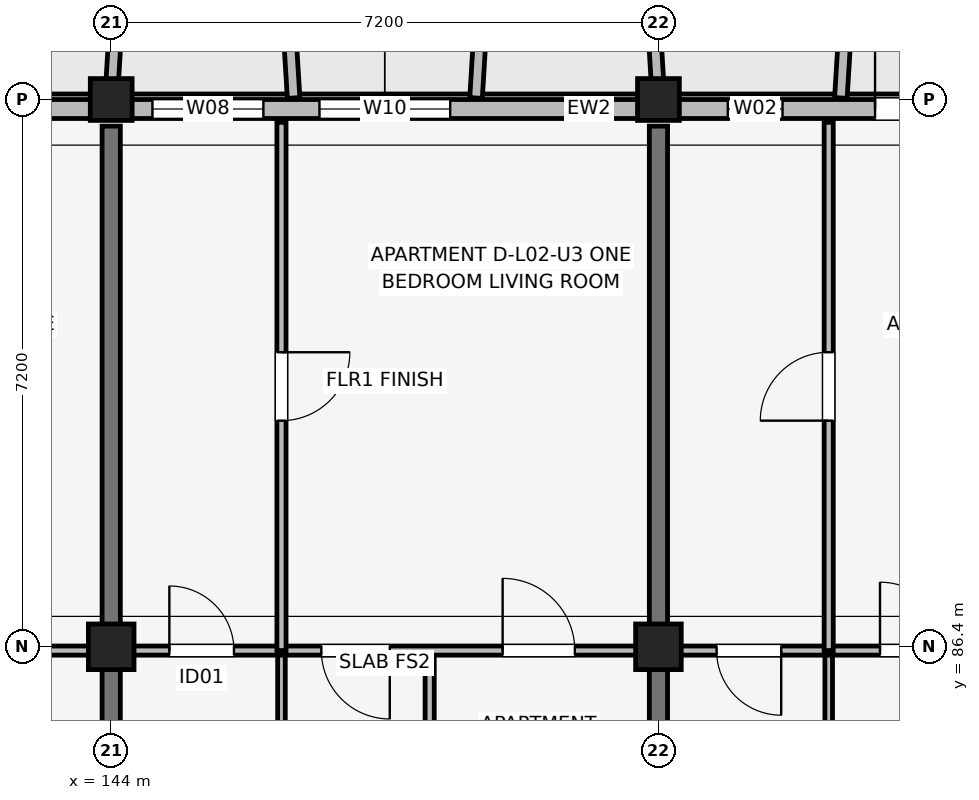
"""IFC4 building model, lengths in metres.
Left out: names, types, materials, properties, quantities, classifications, styles, units other than length and angle.
Written with IfcOpenShell. Run it as: python <this file> out.ifc"""

import sys

from ifc_helpers import new_model, si_unit, direction, frame, frame_2d, origin, origin_2d, place, context, subcontext, project, spatial, rectangle, extrude, element, fill, save


model = new_model("IFC4")
c1 = context("Model", 3, precision=1e-05, world=origin(), true_north=direction((0.0, 1.0)))
c2 = subcontext(c1, "Body", "Model", "MODEL_VIEW")
j1 = project(units=[si_unit("LENGTHUNIT", "METRE"), si_unit("PLANEANGLEUNIT", "RADIAN")], contexts=[c1])
p1 = place(None, origin())
s1 = spatial("IfcSite", under=j1, at=p1, CompositionType="ELEMENT")
p2 = place(p1, origin())
s2 = spatial("IfcBuilding", under=s1, at=p2, CompositionType="ELEMENT")
p3 = place(p2, frame((0.0, 0.0, 8.7)))
s3 = spatial("IfcBuildingStorey", under=s2, at=p3, CompositionType="ELEMENT", Elevation=8.7)
p4 = place(p3, frame((144.0, 86.4, 0.0), z_axis=(0.0, 0.0, 1.0), x_axis=(1.0, 0.0, 0.0)))
e1 = element("IfcColumn", 1, at=p4, inside=s3, PredefinedType="COLUMN", context=c2, shape_type="SweptSolid", body=[
    extrude(rectangle(XDim=0.6, YDim=0.6, at=origin_2d()), origin(), (0.0, 0.0, 1.0), 3.15),
])
p5 = place(p3, frame((144.0, 93.6, 0.0), z_axis=(0.0, 0.0, 1.0), x_axis=(1.0, 0.0, 0.0)))
e2 = element("IfcColumn", 2, at=p5, inside=s3, PredefinedType="COLUMN", context=c2, shape_type="SweptSolid", body=[
    extrude(rectangle(XDim=0.55, YDim=0.55, at=origin_2d()), origin(), (0.0, 0.0, 1.0), 3.15),
])
p6 = place(p3, frame((151.2, 86.4, 0.0), z_axis=(0.0, 0.0, 1.0), x_axis=(1.0, 0.0, 0.0)))
e3 = element("IfcColumn", 3, at=p6, inside=s3, PredefinedType="COLUMN", context=c2, shape_type="SweptSolid", body=[
    extrude(rectangle(XDim=0.6, YDim=0.6, at=origin_2d()), origin(), (0.0, 0.0, 1.0), 3.15),
])
p7 = place(p3, frame((151.2, 93.6, 0.0), z_axis=(0.0, 0.0, 1.0), x_axis=(1.0, 0.0, 0.0)))
e4 = element("IfcColumn", 4, at=p7, inside=s3, PredefinedType="COLUMN", context=c2, shape_type="SweptSolid", body=[
    extrude(rectangle(XDim=0.55, YDim=0.55, at=origin_2d()), origin(), (0.0, 0.0, 1.0), 3.15),
])
for number, where, z_axis, x_axis in (
    (5, (144.0, 83.85, 0.0), (0.0, 0.0, 1.0), (0.0, 1.0, 0.0)),
    (6, (151.2, 83.85, 0.0), (0.0, 0.0, 1.0), (0.0, 1.0, 0.0)),
):
    element("IfcWall", number, at=place(p3, frame(where, z_axis=z_axis, x_axis=x_axis)), inside=s3, PredefinedType="SHEAR", context=c2, shape_type="SweptSolid", body=[
        extrude(rectangle(XDim=9.4, YDim=0.24, at=frame_2d((4.7, 0.0))), origin(), (0.0, 0.0, 1.0), 3.15),
    ])
p8 = place(p3, frame((162.8, 93.475, 0.0), z_axis=(0.0, 0.0, 1.0), x_axis=(-1.0, 0.0, 0.0)))
e7 = element("IfcWall", 7, at=p8, inside=s3, PredefinedType="SOLIDWALL", context=c2, shape_type="SweptSolid", body=[
    extrude(rectangle(XDim=30.4, YDim=0.25, at=frame_2d((15.2, 0.0))), origin(), (0.0, 0.0, 1.0), 2.43),
])
p9 = place(p8, frame((23.225, 0.0, 0.0), z_axis=(0.0, 0.0, 1.0), x_axis=(-1.0, 0.0, 0.0)))
e8 = element("IfcOpeningElement", 8, at=p9, cuts=e7, PredefinedType="OPENING", context=c2, shape_type="SweptSolid", body=[
    extrude(rectangle(XDim=1.65, YDim=2.15, at=frame_2d((0.825, 1.075))), frame((0.0, 0.135, 0.0), z_axis=(0.0, -1.0, 0.0), x_axis=(1.0, 0.0, 0.0)), (0.0, 0.0, 1.0), 0.27),
])
p10 = place(p8, frame((8.75, 0.0, 0.0), z_axis=(0.0, 0.0, 1.0), x_axis=(-1.0, 0.0, 0.0)))
e9 = element("IfcOpeningElement", 9, at=p10, cuts=e7, PredefinedType="OPENING", context=c2, shape_type="SweptSolid", body=[
    extrude(rectangle(XDim=1.5, YDim=2.15, at=frame_2d((0.75, 1.075))), frame((0.0, 0.135, 0.0), z_axis=(0.0, -1.0, 0.0), x_axis=(1.0, 0.0, 0.0)), (0.0, 0.0, 1.0), 0.27),
])
p11 = place(p8, frame((26.438, 0.0, 0.75)))
e10 = element("IfcOpeningElement", 10, at=p11, cuts=e7, PredefinedType="OPENING", context=c2, shape_type="SweptSolid", body=[
    extrude(rectangle(XDim=1.22, YDim=1.5, at=frame_2d((0.61, 0.75))), frame((0.0, 0.135, 0.0), z_axis=(0.0, -1.0, 0.0), x_axis=(1.0, 0.0, 0.0)), (0.0, 0.0, 1.0), 0.27),
])
p12 = place(p8, frame((24.183, 0.0, 0.75)))
e11 = element("IfcOpeningElement", 11, at=p12, cuts=e7, PredefinedType="OPENING", context=c2, shape_type="SweptSolid", body=[
    extrude(rectangle(XDim=1.34, YDim=1.55, at=frame_2d((0.67, 0.775))), frame((0.0, 0.135, 0.0), z_axis=(0.0, -1.0, 0.0), x_axis=(1.0, 0.0, 0.0)), (0.0, 0.0, 1.0), 0.27),
])
p13 = place(p8, frame((16.798, 0.0, 0.75)))
e12 = element("IfcOpeningElement", 12, at=p13, cuts=e7, PredefinedType="OPENING", context=c2, shape_type="SweptSolid", body=[
    extrude(rectangle(XDim=1.46, YDim=1.55, at=frame_2d((0.73, 0.775))), frame((0.0, 0.135, 0.0), z_axis=(0.0, -1.0, 0.0), x_axis=(1.0, 0.0, 0.0)), (0.0, 0.0, 1.0), 0.27),
])
p14 = place(p8, frame((14.34, 0.0, 0.7)))
e13 = element("IfcOpeningElement", 13, at=p14, cuts=e7, PredefinedType="OPENING", context=c2, shape_type="SweptSolid", body=[
    extrude(rectangle(XDim=1.72, YDim=1.6, at=frame_2d((0.86, 0.8))), frame((0.0, 0.135, 0.0), z_axis=(0.0, -1.0, 0.0), x_axis=(1.0, 0.0, 0.0)), (0.0, 0.0, 1.0), 0.27),
])
p15 = place(p8, frame((9.968, 0.0, 0.75)))
e14 = element("IfcOpeningElement", 14, at=p15, cuts=e7, PredefinedType="OPENING", context=c2, shape_type="SweptSolid", body=[
    extrude(rectangle(XDim=0.72, YDim=1.35, at=frame_2d((0.36, 0.675))), frame((0.0, 0.135, 0.0), z_axis=(0.0, -1.0, 0.0), x_axis=(1.0, 0.0, 0.0)), (0.0, 0.0, 1.0), 0.27),
])
p16 = place(p8, frame((2.183, 0.0, 0.7)))
e15 = element("IfcOpeningElement", 15, at=p16, cuts=e7, PredefinedType="OPENING", context=c2, shape_type="SweptSolid", body=[
    extrude(rectangle(XDim=1.72, YDim=1.6, at=frame_2d((0.86, 0.8))), frame((0.0, 0.135, 0.0), z_axis=(0.0, -1.0, 0.0), x_axis=(1.0, 0.0, 0.0)), (0.0, 0.0, 1.0), 0.27),
])
p17 = place(p3, frame((144.0, 93.62, 0.0), z_axis=(0.0, 0.0, 1.0), x_axis=(0.061170732449, 0.998127317276, 0.0)))
e16 = element("IfcWall", 16, at=p17, inside=s3, PredefinedType="ELEMENTEDWALL", context=c2, shape_type="SweptSolid", body=[
    extrude(rectangle(XDim=1.964, YDim=0.165, at=frame_2d((0.982, 0.0))), origin(), (0.0, 0.0, 1.0), 2.95),
])
for number, where, z_axis, x_axis in (
    (17, (146.4, 93.62, 0.0), (0.0, 0.0, 1.0), (-0.061, 0.998, 0.0)),
    (18, (148.8, 93.62, 0.0), (0.0, 0.0, 1.0), (0.061, 0.998, 0.0)),
):
    element("IfcWall", number, at=place(p3, frame(where, z_axis=z_axis, x_axis=x_axis)), inside=s3, PredefinedType="ELEMENTEDWALL", context=c2, shape_type="SweptSolid", body=[
        extrude(rectangle(XDim=1.964, YDim=0.165, at=frame_2d((0.982, 0.0))), origin(), (0.0, 0.0, 1.0), 2.53),
    ])
p18 = place(p3, frame((151.2, 93.62, 0.0), z_axis=(0.0, 0.0, 1.0), x_axis=(-0.061046865508, 0.998134900808, 0.0)))
e19 = element("IfcWall", 19, at=p18, inside=s3, PredefinedType="ELEMENTEDWALL", context=c2, shape_type="SweptSolid", body=[
    extrude(rectangle(XDim=1.964, YDim=0.165, at=frame_2d((0.982, 0.0))), origin(), (0.0, 0.0, 1.0), 2.95),
])
p19 = place(p3, frame((153.6, 93.62, 0.0), z_axis=(0.0, 0.0, 1.0), x_axis=(0.061046865508, 0.998134900808, 0.0)))
e20 = element("IfcWall", 20, at=p19, inside=s3, PredefinedType="ELEMENTEDWALL", context=c2, shape_type="SweptSolid", body=[
    extrude(rectangle(XDim=1.964, YDim=0.165, at=frame_2d((0.982, 0.0))), origin(), (0.0, 0.0, 1.0), 2.55),
])
p20 = place(p3, frame((136.94, 86.35, 0.0), z_axis=(0.0, 0.0, 1.0), x_axis=(1.0, 0.0, 0.0)))
e21 = element("IfcWall", 21, at=p20, inside=s3, PredefinedType="PARTITIONING", context=c2, shape_type="SweptSolid", body=[
    extrude(rectangle(XDim=6.92, YDim=0.12, at=frame_2d((3.46, 0.0))), origin(), (0.0, 0.0, 1.0), 2.375),
])
p21 = place(p20, frame((1.35, 0.0, 0.0), z_axis=(0.0, 0.0, 1.0), x_axis=(-1.0, 0.0, 0.0)))
e22 = element("IfcOpeningElement", 22, at=p21, cuts=e21, PredefinedType="OPENING", context=c2, shape_type="SweptSolid", body=[
    extrude(rectangle(XDim=0.85, YDim=2.08, at=frame_2d((0.425, 1.04))), frame((0.0, 0.07, 0.0), z_axis=(0.0, -1.0, 0.0), x_axis=(1.0, 0.0, 0.0)), (0.0, 0.0, 1.0), 0.14),
])
p22 = place(p20, frame((2.525, 0.0, 0.0)))
e23 = element("IfcOpeningElement", 23, at=p22, cuts=e21, PredefinedType="OPENING", context=c2, shape_type="SweptSolid", body=[
    extrude(rectangle(XDim=0.9, YDim=2.08, at=frame_2d((0.45, 1.04))), frame((0.0, 0.07, 0.0), z_axis=(0.0, -1.0, 0.0), x_axis=(1.0, 0.0, 0.0)), (0.0, 0.0, 1.0), 0.14),
])
p23 = place(p20, frame((5.985, 0.0, 0.0), z_axis=(0.0, 0.0, 1.0), x_axis=(-1.0, 0.0, 0.0)))
e24 = element("IfcOpeningElement", 24, at=p23, cuts=e21, PredefinedType="OPENING", context=c2, shape_type="SweptSolid", body=[
    extrude(rectangle(XDim=0.95, YDim=2.08, at=frame_2d((0.475, 1.04))), frame((0.0, 0.07, 0.0), z_axis=(0.0, -1.0, 0.0), x_axis=(1.0, 0.0, 0.0)), (0.0, 0.0, 1.0), 0.14),
])
p24 = place(p3, frame((146.24, 83.7, 0.0), z_axis=(0.0, 0.0, 1.0), x_axis=(0.0, 1.0, 0.0)))
e25 = element("IfcWall", 25, at=p24, inside=s3, PredefinedType="PARTITIONING", context=c2, shape_type="SweptSolid", body=[
    extrude(rectangle(XDim=2.65, YDim=0.1, at=frame_2d((1.325, 0.0))), origin(), (0.0, 0.0, 1.0), 2.375),
])
p25 = place(p3, frame((148.19, 83.7, 0.0), z_axis=(0.0, 0.0, 1.0), x_axis=(0.0, 1.0, 0.0)))
e26 = element("IfcWall", 26, at=p25, inside=s3, PredefinedType="PARTITIONING", context=c2, shape_type="SweptSolid", body=[
    extrude(rectangle(XDim=2.65, YDim=0.12, at=frame_2d((1.325, 0.0))), origin(), (0.0, 0.0, 1.0), 2.375),
])
p26 = place(p3, frame((144.14, 86.35, 0.0), z_axis=(0.0, 0.0, 1.0), x_axis=(1.0, 0.0, 0.0)))
e27 = element("IfcWall", 27, at=p26, inside=s3, PredefinedType="PARTITIONING", context=c2, shape_type="SweptSolid", body=[
    extrude(rectangle(XDim=6.92, YDim=0.12, at=frame_2d((3.46, 0.0))), origin(), (0.0, 0.0, 1.0), 2.375),
])
p27 = place(p26, frame((0.625, 0.0, 0.0)))
e28 = element("IfcOpeningElement", 28, at=p27, cuts=e27, PredefinedType="OPENING", context=c2, shape_type="SweptSolid", body=[
    extrude(rectangle(XDim=0.85, YDim=2.08, at=frame_2d((0.425, 1.04))), frame((0.0, 0.07, 0.0), z_axis=(0.0, -1.0, 0.0), x_axis=(1.0, 0.0, 0.0)), (0.0, 0.0, 1.0), 0.14),
])
p28 = place(p26, frame((3.525, 0.0, 0.0), z_axis=(0.0, 0.0, 1.0), x_axis=(-1.0, 0.0, 0.0)))
e29 = element("IfcOpeningElement", 29, at=p28, cuts=e27, PredefinedType="OPENING", context=c2, shape_type="SweptSolid", body=[
    extrude(rectangle(XDim=0.9, YDim=2.08, at=frame_2d((0.45, 1.04))), frame((0.0, 0.07, 0.0), z_axis=(0.0, -1.0, 0.0), x_axis=(1.0, 0.0, 0.0)), (0.0, 0.0, 1.0), 0.14),
])
p29 = place(p26, frame((5.01, 0.0, 0.0)))
e30 = element("IfcOpeningElement", 30, at=p29, cuts=e27, PredefinedType="OPENING", context=c2, shape_type="SweptSolid", body=[
    extrude(rectangle(XDim=0.95, YDim=2.08, at=frame_2d((0.475, 1.04))), frame((0.0, 0.07, 0.0), z_axis=(0.0, -1.0, 0.0), x_axis=(1.0, 0.0, 0.0)), (0.0, 0.0, 1.0), 0.14),
])
p30 = place(p3, frame((146.24, 86.35, 0.0), z_axis=(0.0, 0.0, 1.0), x_axis=(0.0, 1.0, 0.0)))
e31 = element("IfcWall", 31, at=p30, inside=s3, PredefinedType="PARTITIONING", context=c2, shape_type="SweptSolid", body=[
    extrude(rectangle(XDim=6.95, YDim=0.12, at=frame_2d((3.475, 0.0))), origin(), (0.0, 0.0, 1.0), 2.375),
])
p31 = place(p30, frame((3.925, 0.0, 0.0), z_axis=(0.0, 0.0, 1.0), x_axis=(-1.0, 0.0, 0.0)))
e32 = element("IfcOpeningElement", 32, at=p31, cuts=e31, PredefinedType="OPENING", context=c2, shape_type="SweptSolid", body=[
    extrude(rectangle(XDim=0.9, YDim=2.08, at=frame_2d((0.45, 1.04))), frame((0.0, 0.07, 0.0), z_axis=(0.0, -1.0, 0.0), x_axis=(1.0, 0.0, 0.0)), (0.0, 0.0, 1.0), 0.14),
])
p32 = place(p3, frame((153.44, 83.7, 0.0), z_axis=(0.0, 0.0, 1.0), x_axis=(0.0, 1.0, 0.0)))
e33 = element("IfcWall", 33, at=p32, inside=s3, PredefinedType="PARTITIONING", context=c2, shape_type="SweptSolid", body=[
    extrude(rectangle(XDim=2.65, YDim=0.1, at=frame_2d((1.325, 0.0))), origin(), (0.0, 0.0, 1.0), 2.375),
])
p33 = place(p3, frame((151.34, 86.35, 0.0), z_axis=(0.0, 0.0, 1.0), x_axis=(1.0, 0.0, 0.0)))
e34 = element("IfcWall", 34, at=p33, inside=s3, PredefinedType="PARTITIONING", context=c2, shape_type="SweptSolid", body=[
    extrude(rectangle(XDim=6.92, YDim=0.12, at=frame_2d((3.46, 0.0))), origin(), (0.0, 0.0, 1.0), 2.375),
])
p34 = place(p33, frame((1.475, 0.0, 0.0), z_axis=(0.0, 0.0, 1.0), x_axis=(-1.0, 0.0, 0.0)))
e35 = element("IfcOpeningElement", 35, at=p34, cuts=e34, PredefinedType="OPENING", context=c2, shape_type="SweptSolid", body=[
    extrude(rectangle(XDim=0.85, YDim=2.08, at=frame_2d((0.425, 1.04))), frame((0.0, 0.07, 0.0), z_axis=(0.0, -1.0, 0.0), x_axis=(1.0, 0.0, 0.0)), (0.0, 0.0, 1.0), 0.14),
])
p35 = place(p33, frame((2.775, 0.0, 0.0)))
e36 = element("IfcOpeningElement", 36, at=p35, cuts=e34, PredefinedType="OPENING", context=c2, shape_type="SweptSolid", body=[
    extrude(rectangle(XDim=0.9, YDim=2.08, at=frame_2d((0.45, 1.04))), frame((0.0, 0.07, 0.0), z_axis=(0.0, -1.0, 0.0), x_axis=(1.0, 0.0, 0.0)), (0.0, 0.0, 1.0), 0.14),
])
p36 = place(p33, frame((6.11, 0.0, 0.0), z_axis=(0.0, 0.0, 1.0), x_axis=(-1.0, 0.0, 0.0)))
e37 = element("IfcOpeningElement", 37, at=p36, cuts=e34, PredefinedType="OPENING", context=c2, shape_type="SweptSolid", body=[
    extrude(rectangle(XDim=0.95, YDim=2.08, at=frame_2d((0.475, 1.04))), frame((0.0, 0.07, 0.0), z_axis=(0.0, -1.0, 0.0), x_axis=(1.0, 0.0, 0.0)), (0.0, 0.0, 1.0), 0.14),
])
p37 = place(p3, frame((153.44, 86.35, 0.0), z_axis=(0.0, 0.0, 1.0), x_axis=(0.0, 1.0, 0.0)))
e38 = element("IfcWall", 38, at=p37, inside=s3, PredefinedType="PARTITIONING", context=c2, shape_type="SweptSolid", body=[
    extrude(rectangle(XDim=6.95, YDim=0.12, at=frame_2d((3.475, 0.0))), origin(), (0.0, 0.0, 1.0), 2.375),
])
p38 = place(p37, frame((3.025, 0.0, 0.0)))
e39 = element("IfcOpeningElement", 39, at=p38, cuts=e38, PredefinedType="OPENING", context=c2, shape_type="SweptSolid", body=[
    extrude(rectangle(XDim=0.9, YDim=2.08, at=frame_2d((0.45, 1.04))), frame((0.0, 0.07, 0.0), z_axis=(0.0, -1.0, 0.0), x_axis=(1.0, 0.0, 0.0)), (0.0, 0.0, 1.0), 0.14),
])
p39 = place(p10, origin())
e40 = element("IfcDoor", 40, at=p39, inside=s3, OperationType="SINGLE_SWING_RIGHT", PredefinedType="DOOR", context=c2, shape_type="SweptSolid", body=[
    extrude(rectangle(XDim=1.5, YDim=2.15, at=frame_2d((0.75, 1.075))), frame((0.0, 0.025, 0.0), z_axis=(0.0, -1.0, 0.0), x_axis=(1.0, 0.0, 0.0)), (0.0, 0.0, 1.0), 0.05),
])
fill(e9, e40)
p40 = place(p13, origin())
e41 = element("IfcWindow", 41, at=p40, inside=s3, PartitioningType="SINGLE_PANEL", PredefinedType="WINDOW", context=c2, shape_type="SweptSolid", body=[
    extrude(rectangle(XDim=1.46, YDim=1.55, at=frame_2d((0.73, 0.775))), frame((0.0, 0.03, 0.0), z_axis=(0.0, -1.0, 0.0), x_axis=(1.0, 0.0, 0.0)), (0.0, 0.0, 1.0), 0.06),
])
fill(e12, e41)
p41 = place(p14, origin())
e42 = element("IfcWindow", 42, at=p41, inside=s3, PartitioningType="SINGLE_PANEL", PredefinedType="WINDOW", context=c2, shape_type="SweptSolid", body=[
    extrude(rectangle(XDim=1.72, YDim=1.6, at=frame_2d((0.86, 0.8))), frame((0.0, 0.03, 0.0), z_axis=(0.0, -1.0, 0.0), x_axis=(1.0, 0.0, 0.0)), (0.0, 0.0, 1.0), 0.06),
])
fill(e13, e42)
p42 = place(p15, origin())
e43 = element("IfcWindow", 43, at=p42, inside=s3, PartitioningType="SINGLE_PANEL", PredefinedType="WINDOW", context=c2, shape_type="SweptSolid", body=[
    extrude(rectangle(XDim=0.72, YDim=1.35, at=frame_2d((0.36, 0.675))), frame((0.0, 0.03, 0.0), z_axis=(0.0, -1.0, 0.0), x_axis=(1.0, 0.0, 0.0)), (0.0, 0.0, 1.0), 0.06),
])
fill(e14, e43)
p43 = place(p27, origin())
e44 = element("IfcDoor", 44, at=p43, inside=s3, OperationType="SINGLE_SWING_LEFT", PredefinedType="DOOR", context=c2, shape_type="SweptSolid", body=[
    extrude(rectangle(XDim=0.85, YDim=2.08, at=frame_2d((0.425, 1.04))), frame((0.0, 0.025, 0.0), z_axis=(0.0, -1.0, 0.0), x_axis=(1.0, 0.0, 0.0)), (0.0, 0.0, 1.0), 0.05),
])
fill(e28, e44)
p44 = place(p28, origin())
e45 = element("IfcDoor", 45, at=p44, inside=s3, OperationType="SINGLE_SWING_RIGHT", PredefinedType="DOOR", context=c2, shape_type="SweptSolid", body=[
    extrude(rectangle(XDim=0.9, YDim=2.08, at=frame_2d((0.45, 1.04))), frame((0.0, 0.025, 0.0), z_axis=(0.0, -1.0, 0.0), x_axis=(1.0, 0.0, 0.0)), (0.0, 0.0, 1.0), 0.05),
])
fill(e29, e45)
p45 = place(p29, origin())
e46 = element("IfcDoor", 46, at=p45, inside=s3, OperationType="SINGLE_SWING_LEFT", PredefinedType="DOOR", context=c2, shape_type="SweptSolid", body=[
    extrude(rectangle(XDim=0.95, YDim=2.08, at=frame_2d((0.475, 1.04))), frame((0.0, 0.025, 0.0), z_axis=(0.0, -1.0, 0.0), x_axis=(1.0, 0.0, 0.0)), (0.0, 0.0, 1.0), 0.05),
])
fill(e30, e46)
p46 = place(p31, origin())
e47 = element("IfcDoor", 47, at=p46, inside=s3, OperationType="SINGLE_SWING_RIGHT", PredefinedType="DOOR", context=c2, shape_type="SweptSolid", body=[
    extrude(rectangle(XDim=0.9, YDim=2.08, at=frame_2d((0.45, 1.04))), frame((0.0, 0.025, 0.0), z_axis=(0.0, -1.0, 0.0), x_axis=(1.0, 0.0, 0.0)), (0.0, 0.0, 1.0), 0.05),
])
fill(e32, e47)
p47 = place(p34, origin())
e48 = element("IfcDoor", 48, at=p47, inside=s3, OperationType="SINGLE_SWING_RIGHT", PredefinedType="DOOR", context=c2, shape_type="SweptSolid", body=[
    extrude(rectangle(XDim=0.85, YDim=2.08, at=frame_2d((0.425, 1.04))), frame((0.0, 0.025, 0.0), z_axis=(0.0, -1.0, 0.0), x_axis=(1.0, 0.0, 0.0)), (0.0, 0.0, 1.0), 0.05),
])
fill(e35, e48)
p48 = place(p35, origin())
e49 = element("IfcDoor", 49, at=p48, inside=s3, OperationType="SINGLE_SWING_LEFT", PredefinedType="DOOR", context=c2, shape_type="SweptSolid", body=[
    extrude(rectangle(XDim=0.9, YDim=2.08, at=frame_2d((0.45, 1.04))), frame((0.0, 0.025, 0.0), z_axis=(0.0, -1.0, 0.0), x_axis=(1.0, 0.0, 0.0)), (0.0, 0.0, 1.0), 0.05),
])
fill(e36, e49)
p49 = place(p38, origin())
e50 = element("IfcDoor", 50, at=p49, inside=s3, OperationType="SINGLE_SWING_LEFT", PredefinedType="DOOR", context=c2, shape_type="SweptSolid", body=[
    extrude(rectangle(XDim=0.9, YDim=2.08, at=frame_2d((0.45, 1.04))), frame((0.0, 0.025, 0.0), z_axis=(0.0, -1.0, 0.0), x_axis=(1.0, 0.0, 0.0)), (0.0, 0.0, 1.0), 0.05),
])
fill(e39, e50)
save(model, sys.argv[1])
